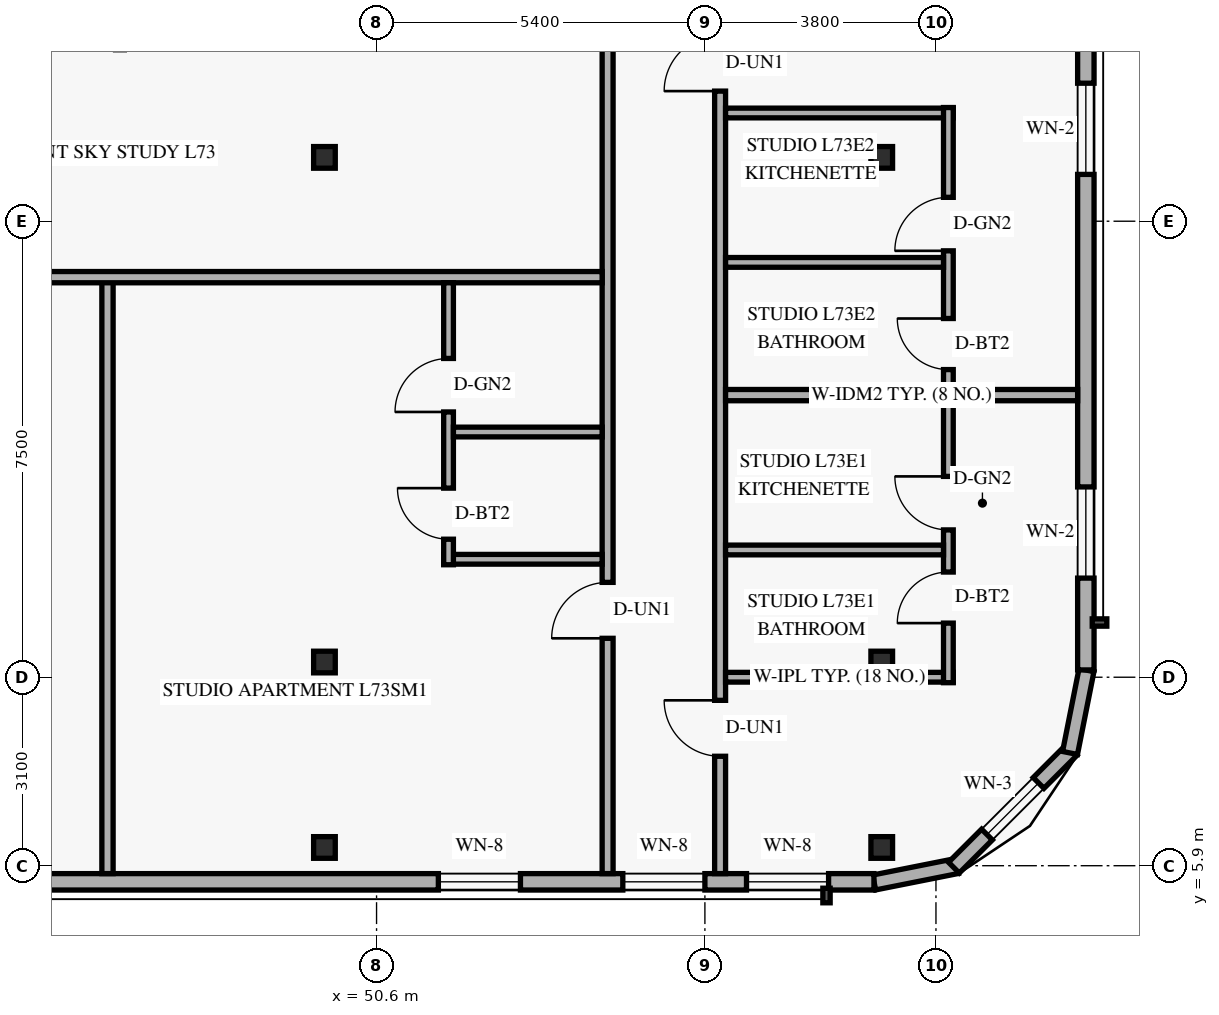
"""IFC4 building model, lengths in metres.
Left out: names, types, materials, properties, quantities, classifications, styles, units other than length and angle.
Written with IfcOpenShell. Run it as: python <this file> out.ifc"""

import sys

from ifc_helpers import new_model, si_unit, direction, frame, frame_2d, origin, origin_2d, place, context, subcontext, project, spatial, rectangle, hollow_rectangle, extrude, element, fill, save


model = new_model("IFC4")
c1 = context("Model", 3, precision=1e-05, world=origin(), true_north=direction((0.0, 1.0)))
c2 = subcontext(c1, "Body", "Model", "MODEL_VIEW")
j1 = project(units=[si_unit("LENGTHUNIT", "METRE"), si_unit("PLANEANGLEUNIT", "RADIAN")], contexts=[c1])
p1 = place(None, origin())
s1 = spatial("IfcSite", under=j1, at=p1, CompositionType="ELEMENT")
p2 = place(p1, origin())
s2 = spatial("IfcBuilding", under=s1, at=p2, CompositionType="ELEMENT")
p3 = place(p2, frame((0.0, 0.0, 278.4)))
s3 = spatial("IfcBuildingStorey", under=s2, at=p3, CompositionType="ELEMENT", Elevation=278.4)
for number, where, z_axis, x_axis in (
    (1, (49.68, 6.2, 0.0), (0.035, 0.0, 0.999), (0.0, 1.0, 0.0)),
    (2, (49.68, 9.25, 0.0), (0.035, 0.0, 0.999), (0.0, 1.0, 0.0)),
    (3, (49.68, 17.55, 0.0), (0.035, 0.0, 0.999), (0.0, 1.0, 0.0)),
):
    element("IfcColumn", number, at=place(p3, frame(where, z_axis=z_axis, x_axis=x_axis)), inside=s3, PredefinedType="COLUMN", context=c2, shape_type="SweptSolid", body=[
        extrude(hollow_rectangle(XDim=0.356, YDim=0.356, WallThickness=0.016, at=origin_2d()), origin(), (0.0, 0.0, 1.0), 3.602),
    ])
for number, where, z_axis, x_axis in (
    (4, (58.804, 6.2, 0.0), (0.058, 0.0, 0.998), (0.0, 1.0, 0.0)),
    (5, (58.804, 9.25, 0.0), (0.058, 0.0, 0.998), (0.0, 1.0, 0.0)),
    (6, (58.804, 17.55, 0.0), (0.058, 0.0, 0.998), (0.0, 1.0, 0.0)),
):
    element("IfcColumn", number, at=place(p3, frame(where, z_axis=z_axis, x_axis=x_axis)), inside=s3, PredefinedType="COLUMN", context=c2, shape_type="SweptSolid", body=[
        extrude(hollow_rectangle(XDim=0.356, YDim=0.356, WallThickness=0.016, at=origin_2d()), origin(), (0.0, 0.0, 1.0), 3.606),
    ])
p4 = place(p3, frame((58.783, 5.624, 0.0), z_axis=(0.0, 0.0, 1.0), x_axis=(0.980809899341, 0.19496651342, 0.0)))
e7 = element("IfcWall", 7, at=p4, inside=s3, PredefinedType="SOLIDWALL", context=c2, shape_type="SweptSolid", body=[
    extrude(rectangle(XDim=1.389, YDim=0.25, at=frame_2d((0.694, 0.0))), origin(), (0.0, 0.0, 1.0), 3.3),
])
p5 = place(p3, frame((60.095, 5.868, 0.0), z_axis=(0.0, 0.0, 1.0), x_axis=(0.707106781187, 0.707106781187, 0.0)))
e8 = element("IfcWall", 8, at=p5, inside=s3, PredefinedType="SOLIDWALL", context=c2, shape_type="SweptSolid", body=[
    extrude(rectangle(XDim=2.739, YDim=0.25, at=frame_2d((1.37, 0.0))), origin(), (0.0, 0.0, 1.0), 3.3),
])
p6 = place(p5, frame((0.77, 0.0, 0.85)))
e9 = element("IfcOpeningElement", 9, at=p6, cuts=e8, PredefinedType="OPENING", context=c2, shape_type="SweptSolid", body=[
    extrude(rectangle(XDim=1.2, YDim=1.5, at=frame_2d((0.6, 0.75))), frame((0.0, 0.135, 0.0), z_axis=(0.0, -1.0, 0.0), x_axis=(1.0, 0.0, 0.0)), (0.0, 0.0, 1.0), 0.27),
])
p7 = place(p3, frame((62.005, 7.754, 0.0), z_axis=(0.0, 0.0, 1.0), x_axis=(0.195135625965, 0.9807762678, 0.0)))
e10 = element("IfcWall", 10, at=p7, inside=s3, PredefinedType="SOLIDWALL", context=c2, shape_type="SweptSolid", body=[
    extrude(rectangle(XDim=1.389, YDim=0.25, at=frame_2d((0.694, 0.0))), origin(), (0.0, 0.0, 1.0), 3.3),
])
p8 = place(p3, frame((25.82, 5.635, 0.0), z_axis=(0.0, 0.0, 1.0), x_axis=(1.0, 0.0, 0.0)))
e11 = element("IfcWall", 11, at=p8, inside=s3, PredefinedType="SOLIDWALL", context=c2, shape_type="SweptSolid", body=[
    extrude(rectangle(XDim=32.96, YDim=0.27, at=frame_2d((16.48, 0.0))), origin(), (0.0, 0.0, 1.0), 3.3),
])
p9 = place(p8, frame((14.413, 0.0, 0.85)))
e12 = element("IfcOpeningElement", 12, at=p9, cuts=e11, PredefinedType="OPENING", context=c2, shape_type="SweptSolid", body=[
    extrude(rectangle(XDim=1.35, YDim=1.55, at=frame_2d((0.675, 0.775))), frame((0.0, 0.145, 0.0), z_axis=(0.0, -1.0, 0.0), x_axis=(1.0, 0.0, 0.0)), (0.0, 0.0, 1.0), 0.29),
])
p10 = place(p8, frame((25.796, 0.0, 0.85)))
e13 = element("IfcOpeningElement", 13, at=p10, cuts=e11, PredefinedType="OPENING", context=c2, shape_type="SweptSolid", body=[
    extrude(rectangle(XDim=1.35, YDim=1.55, at=frame_2d((0.675, 0.775))), frame((0.0, 0.145, 0.0), z_axis=(0.0, -1.0, 0.0), x_axis=(1.0, 0.0, 0.0)), (0.0, 0.0, 1.0), 0.29),
])
p11 = place(p8, frame((28.83, 0.0, 0.85)))
e14 = element("IfcOpeningElement", 14, at=p11, cuts=e11, PredefinedType="OPENING", context=c2, shape_type="SweptSolid", body=[
    extrude(rectangle(XDim=1.35, YDim=1.55, at=frame_2d((0.675, 0.775))), frame((0.0, 0.145, 0.0), z_axis=(0.0, -1.0, 0.0), x_axis=(1.0, 0.0, 0.0)), (0.0, 0.0, 1.0), 0.29),
])
p12 = place(p8, frame((30.864, 0.0, 0.85)))
e15 = element("IfcOpeningElement", 15, at=p12, cuts=e11, PredefinedType="OPENING", context=c2, shape_type="SweptSolid", body=[
    extrude(rectangle(XDim=1.35, YDim=1.55, at=frame_2d((0.675, 0.775))), frame((0.0, 0.145, 0.0), z_axis=(0.0, -1.0, 0.0), x_axis=(1.0, 0.0, 0.0)), (0.0, 0.0, 1.0), 0.29),
])
p13 = place(p3, frame((62.265, 9.12, 0.0), z_axis=(0.0, 0.0, 1.0), x_axis=(0.0, 1.0, 0.0)))
e16 = element("IfcWall", 16, at=p13, inside=s3, PredefinedType="SOLIDWALL", context=c2, shape_type="SweptSolid", body=[
    extrude(rectangle(XDim=13.28, YDim=0.27, at=frame_2d((6.64, 0.0))), origin(), (0.0, 0.0, 1.0), 3.3),
])
p14 = place(p13, frame((1.51, 0.0, 0.85)))
e17 = element("IfcOpeningElement", 17, at=p14, cuts=e16, PredefinedType="OPENING", context=c2, shape_type="SweptSolid", body=[
    extrude(rectangle(XDim=1.5, YDim=1.55, at=frame_2d((0.75, 0.775))), frame((0.0, 0.145, 0.0), z_axis=(0.0, -1.0, 0.0), x_axis=(1.0, 0.0, 0.0)), (0.0, 0.0, 1.0), 0.29),
])
p15 = place(p13, frame((8.15, 0.0, 0.85)))
e18 = element("IfcOpeningElement", 18, at=p15, cuts=e16, PredefinedType="OPENING", context=c2, shape_type="SweptSolid", body=[
    extrude(rectangle(XDim=1.5, YDim=1.55, at=frame_2d((0.75, 0.775))), frame((0.0, 0.145, 0.0), z_axis=(0.0, -1.0, 0.0), x_axis=(1.0, 0.0, 0.0)), (0.0, 0.0, 1.0), 0.29),
])
p16 = place(p3, frame((54.4, 5.77, 0.0), z_axis=(0.0, 0.0, 1.0), x_axis=(0.0, 1.0, 0.0)))
e19 = element("IfcWall", 19, at=p16, inside=s3, PredefinedType="STANDARD", context=c2, shape_type="SweptSolid", body=[
    extrude(rectangle(XDim=21.79, YDim=0.18, at=frame_2d((10.895, 0.0))), origin(), (0.0, 0.0, 1.0), 2.743),
])
p17 = place(p16, frame((3.87, 0.0, 0.0)))
e20 = element("IfcOpeningElement", 20, at=p17, cuts=e19, PredefinedType="OPENING", context=c2, shape_type="SweptSolid", body=[
    extrude(rectangle(XDim=0.92, YDim=2.15, at=frame_2d((0.46, 1.075))), frame((0.0, 0.1, 0.0), z_axis=(0.0, -1.0, 0.0), x_axis=(1.0, 0.0, 0.0)), (0.0, 0.0, 1.0), 0.2),
])
p18 = place(p3, frame((56.25, 5.77, 0.0), z_axis=(0.0, 0.0, 1.0), x_axis=(0.0, 1.0, 0.0)))
e21 = element("IfcWall", 21, at=p18, inside=s3, PredefinedType="STANDARD", context=c2, shape_type="SweptSolid", body=[
    extrude(rectangle(XDim=36.46, YDim=0.18, at=frame_2d((18.23, 0.0))), origin(), (0.0, 0.0, 1.0), 2.743),
])
p19 = place(p18, frame((1.93, 0.0, 0.0)))
e22 = element("IfcOpeningElement", 22, at=p19, cuts=e21, PredefinedType="OPENING", context=c2, shape_type="SweptSolid", body=[
    extrude(rectangle(XDim=0.92, YDim=2.15, at=frame_2d((0.46, 1.075))), frame((0.0, 0.1, 0.0), z_axis=(0.0, -1.0, 0.0), x_axis=(1.0, 0.0, 0.0)), (0.0, 0.0, 1.0), 0.2),
])
p20 = place(p18, frame((12.87, 0.0, 0.0)))
e23 = element("IfcOpeningElement", 23, at=p20, cuts=e21, PredefinedType="OPENING", context=c2, shape_type="SweptSolid", body=[
    extrude(rectangle(XDim=0.92, YDim=2.15, at=frame_2d((0.46, 1.075))), frame((0.0, 0.1, 0.0), z_axis=(0.0, -1.0, 0.0), x_axis=(1.0, 0.0, 0.0)), (0.0, 0.0, 1.0), 0.2),
])
p21 = place(p18, frame((21.38, 0.0, 0.0)))
e24 = element("IfcOpeningElement", 24, at=p21, cuts=e21, PredefinedType="OPENING", context=c2, shape_type="SweptSolid", body=[
    extrude(rectangle(XDim=0.92, YDim=2.15, at=frame_2d((0.46, 1.075))), frame((0.0, 0.1, 0.0), z_axis=(0.0, -1.0, 0.0), x_axis=(1.0, 0.0, 0.0)), (0.0, 0.0, 1.0), 0.2),
])
p22 = place(p18, frame((27.39, 0.0, 0.0)))
e25 = element("IfcOpeningElement", 25, at=p22, cuts=e21, PredefinedType="OPENING", context=c2, shape_type="SweptSolid", body=[
    extrude(rectangle(XDim=0.92, YDim=2.15, at=frame_2d((0.46, 1.075))), frame((0.0, 0.1, 0.0), z_axis=(0.0, -1.0, 0.0), x_axis=(1.0, 0.0, 0.0)), (0.0, 0.0, 1.0), 0.2),
])
p23 = place(p18, frame((33.235, 0.0, 0.0)))
e26 = element("IfcOpeningElement", 26, at=p23, cuts=e21, PredefinedType="OPENING", context=c2, shape_type="SweptSolid", body=[
    extrude(rectangle(XDim=0.92, YDim=2.15, at=frame_2d((0.46, 1.075))), frame((0.0, 0.1, 0.0), z_axis=(0.0, -1.0, 0.0), x_axis=(1.0, 0.0, 0.0)), (0.0, 0.0, 1.0), 0.2),
])
p24 = place(p3, frame((56.34, 9.0, 0.0), z_axis=(0.0, 0.0, 1.0), x_axis=(1.0, 0.0, 0.0)))
e27 = element("IfcWall", 27, at=p24, inside=s3, PredefinedType="PLUMBINGWALL", context=c2, shape_type="SweptSolid", body=[
    extrude(rectangle(XDim=3.744, YDim=0.16, at=frame_2d((1.872, 0.0))), origin(), (0.0, 0.0, 1.0), 2.743),
])
p25 = place(p3, frame((60.004, 8.91, 0.0), z_axis=(0.0, 0.0, 1.0), x_axis=(0.0, 1.0, 0.0)))
e28 = element("IfcWall", 28, at=p25, inside=s3, PredefinedType="PLUMBINGWALL", context=c2, shape_type="SweptSolid", body=[
    extrude(rectangle(XDim=4.73, YDim=0.16, at=frame_2d((2.365, 0.0))), origin(), (0.0, 0.0, 1.0), 3.3),
])
p26 = place(p25, frame((0.98, 0.0, 0.0)))
e29 = element("IfcOpeningElement", 29, at=p26, cuts=e28, PredefinedType="OPENING", context=c2, shape_type="SweptSolid", body=[
    extrude(rectangle(XDim=0.84, YDim=2.12, at=frame_2d((0.42, 1.06))), frame((0.0, 0.09, 0.0), z_axis=(0.0, -1.0, 0.0), x_axis=(1.0, 0.0, 0.0)), (0.0, 0.0, 1.0), 0.18),
])
p27 = place(p25, frame((2.513, 0.0, 0.0)))
e30 = element("IfcOpeningElement", 30, at=p27, cuts=e28, PredefinedType="OPENING", context=c2, shape_type="SweptSolid", body=[
    extrude(rectangle(XDim=0.88, YDim=2.12, at=frame_2d((0.44, 1.06))), frame((0.0, 0.09, 0.0), z_axis=(0.0, -1.0, 0.0), x_axis=(1.0, 0.0, 0.0)), (0.0, 0.0, 1.0), 0.18),
])
p28 = place(p3, frame((56.34, 11.093, 0.0), z_axis=(0.0, 0.0, 1.0), x_axis=(1.0, 0.0, 0.0)))
e31 = element("IfcWall", 31, at=p28, inside=s3, PredefinedType="PLUMBINGWALL", context=c2, shape_type="SweptSolid", body=[
    extrude(rectangle(XDim=3.584, YDim=0.16, at=frame_2d((1.792, 0.0))), origin(), (0.0, 0.0, 1.0), 2.743),
])
p29 = place(p3, frame((56.34, 13.64, 0.0), z_axis=(0.0, 0.0, 1.0), x_axis=(1.0, 0.0, 0.0)))
e32 = element("IfcWall", 32, at=p29, inside=s3, PredefinedType="PARTITIONING", context=c2, shape_type="SweptSolid", body=[
    extrude(rectangle(XDim=5.79, YDim=0.185, at=frame_2d((2.895, 0.0))), origin(), (0.0, 0.0, 1.0), 2.743),
])
p30 = place(p3, frame((56.34, 18.28, 0.0), z_axis=(0.0, 0.0, 1.0), x_axis=(1.0, 0.0, 0.0)))
e33 = element("IfcWall", 33, at=p30, inside=s3, PredefinedType="PLUMBINGWALL", context=c2, shape_type="SweptSolid", body=[
    extrude(rectangle(XDim=3.744, YDim=0.16, at=frame_2d((1.872, 0.0))), origin(), (0.0, 0.0, 1.0), 2.743),
])
p31 = place(p3, frame((60.004, 13.732, 0.0), z_axis=(0.0, 0.0, 1.0), x_axis=(0.0, 1.0, 0.0)))
e34 = element("IfcWall", 34, at=p31, inside=s3, PredefinedType="PLUMBINGWALL", context=c2, shape_type="SweptSolid", body=[
    extrude(rectangle(XDim=4.638, YDim=0.16, at=frame_2d((2.319, 0.0))), origin(), (0.0, 0.0, 1.0), 3.3),
])
p32 = place(p31, frame((0.327, 0.0, 0.0)))
e35 = element("IfcOpeningElement", 35, at=p32, cuts=e34, PredefinedType="OPENING", context=c2, shape_type="SweptSolid", body=[
    extrude(rectangle(XDim=0.84, YDim=2.12, at=frame_2d((0.42, 1.06))), frame((0.0, 0.09, 0.0), z_axis=(0.0, -1.0, 0.0), x_axis=(1.0, 0.0, 0.0)), (0.0, 0.0, 1.0), 0.18),
])
p33 = place(p31, frame((2.281, 0.0, 0.0)))
e36 = element("IfcOpeningElement", 36, at=p33, cuts=e34, PredefinedType="OPENING", context=c2, shape_type="SweptSolid", body=[
    extrude(rectangle(XDim=0.88, YDim=2.12, at=frame_2d((0.44, 1.06))), frame((0.0, 0.09, 0.0), z_axis=(0.0, -1.0, 0.0), x_axis=(1.0, 0.0, 0.0)), (0.0, 0.0, 1.0), 0.18),
])
p34 = place(p3, frame((56.34, 15.823, 0.0), z_axis=(0.0, 0.0, 1.0), x_axis=(1.0, 0.0, 0.0)))
e37 = element("IfcWall", 37, at=p34, inside=s3, PredefinedType="PLUMBINGWALL", context=c2, shape_type="SweptSolid", body=[
    extrude(rectangle(XDim=3.584, YDim=0.16, at=frame_2d((1.792, 0.0))), origin(), (0.0, 0.0, 1.0), 2.743),
])
p35 = place(p3, frame((46.175, 5.77, 0.0), z_axis=(0.0, 0.0, 1.0), x_axis=(0.0, 1.0, 0.0)))
e38 = element("IfcWall", 38, at=p35, inside=s3, PredefinedType="PARTITIONING", context=c2, shape_type="SweptSolid", body=[
    extrude(rectangle(XDim=9.81, YDim=0.185, at=frame_2d((4.905, 0.0))), origin(), (0.0, 0.0, 1.0), 2.743),
])
p36 = place(p3, frame((38.022, 15.58, 0.0), z_axis=(0.0, 0.0, 1.0), x_axis=(1.0, 0.0, 0.0)))
e39 = element("IfcWall", 39, at=p36, inside=s3, PredefinedType="PARTITIONING", context=c2, shape_type="SweptSolid", body=[
    extrude(rectangle(XDim=16.288, YDim=0.185, at=frame_2d((8.144, 0.0))), origin(), (0.0, 0.0, 1.0), 2.743),
])
p37 = place(p3, frame((51.704, 10.94, 0.0), z_axis=(0.0, 0.0, 1.0), x_axis=(1.0, 0.0, 0.0)))
e40 = element("IfcWall", 40, at=p37, inside=s3, PredefinedType="PLUMBINGWALL", context=c2, shape_type="SweptSolid", body=[
    extrude(rectangle(XDim=2.606, YDim=0.16, at=frame_2d((1.303, 0.0))), origin(), (0.0, 0.0, 1.0), 3.3),
])
p38 = place(p3, frame((51.784, 10.85, 0.0), z_axis=(0.0, 0.0, 1.0), x_axis=(0.0, 1.0, 0.0)))
e41 = element("IfcWall", 41, at=p38, inside=s3, PredefinedType="PLUMBINGWALL", context=c2, shape_type="SweptSolid", body=[
    extrude(rectangle(XDim=4.637, YDim=0.16, at=frame_2d((2.319, 0.0))), origin(), (0.0, 0.0, 1.0), 2.979),
])
p39 = place(p38, frame((0.42, 0.0, 0.0)))
e42 = element("IfcOpeningElement", 42, at=p39, cuts=e41, PredefinedType="OPENING", context=c2, shape_type="SweptSolid", body=[
    extrude(rectangle(XDim=0.84, YDim=2.12, at=frame_2d((0.42, 1.06))), frame((0.0, 0.09, 0.0), z_axis=(0.0, -1.0, 0.0), x_axis=(1.0, 0.0, 0.0)), (0.0, 0.0, 1.0), 0.18),
])
p40 = place(p38, frame((2.513, 0.0, 0.0)))
e43 = element("IfcOpeningElement", 43, at=p40, cuts=e41, PredefinedType="OPENING", context=c2, shape_type="SweptSolid", body=[
    extrude(rectangle(XDim=0.88, YDim=2.12, at=frame_2d((0.44, 1.06))), frame((0.0, 0.09, 0.0), z_axis=(0.0, -1.0, 0.0), x_axis=(1.0, 0.0, 0.0)), (0.0, 0.0, 1.0), 0.18),
])
p41 = place(p3, frame((51.864, 13.033, 0.0), z_axis=(0.0, 0.0, 1.0), x_axis=(1.0, 0.0, 0.0)))
e44 = element("IfcWall", 44, at=p41, inside=s3, PredefinedType="PLUMBINGWALL", context=c2, shape_type="SweptSolid", body=[
    extrude(rectangle(XDim=2.446, YDim=0.16, at=frame_2d((1.223, 0.0))), origin(), (0.0, 0.0, 1.0), 3.3),
])
p42 = place(p6, origin())
e45 = element("IfcWindow", 45, at=p42, inside=s3, PartitioningType="SINGLE_PANEL", PredefinedType="WINDOW", context=c2, shape_type="SweptSolid", body=[
    extrude(rectangle(XDim=1.2, YDim=1.5, at=frame_2d((0.6, 0.75))), frame((0.0, 0.03, 0.0), z_axis=(0.0, -1.0, 0.0), x_axis=(1.0, 0.0, 0.0)), (0.0, 0.0, 1.0), 0.06),
])
fill(e9, e45)
p43 = place(p10, origin())
e46 = element("IfcWindow", 46, at=p43, inside=s3, PartitioningType="SINGLE_PANEL", PredefinedType="WINDOW", context=c2, shape_type="SweptSolid", body=[
    extrude(rectangle(XDim=1.35, YDim=1.55, at=frame_2d((0.675, 0.775))), frame((0.0, 0.03, 0.0), z_axis=(0.0, -1.0, 0.0), x_axis=(1.0, 0.0, 0.0)), (0.0, 0.0, 1.0), 0.06),
])
fill(e13, e46)
p44 = place(p11, origin())
e47 = element("IfcWindow", 47, at=p44, inside=s3, PartitioningType="SINGLE_PANEL", PredefinedType="WINDOW", context=c2, shape_type="SweptSolid", body=[
    extrude(rectangle(XDim=1.35, YDim=1.55, at=frame_2d((0.675, 0.775))), frame((0.0, 0.03, 0.0), z_axis=(0.0, -1.0, 0.0), x_axis=(1.0, 0.0, 0.0)), (0.0, 0.0, 1.0), 0.06),
])
fill(e14, e47)
p45 = place(p12, origin())
e48 = element("IfcWindow", 48, at=p45, inside=s3, PartitioningType="SINGLE_PANEL", PredefinedType="WINDOW", context=c2, shape_type="SweptSolid", body=[
    extrude(rectangle(XDim=1.35, YDim=1.55, at=frame_2d((0.675, 0.775))), frame((0.0, 0.03, 0.0), z_axis=(0.0, -1.0, 0.0), x_axis=(1.0, 0.0, 0.0)), (0.0, 0.0, 1.0), 0.06),
])
fill(e15, e48)
p46 = place(p14, origin())
e49 = element("IfcWindow", 49, at=p46, inside=s3, PartitioningType="SINGLE_PANEL", PredefinedType="WINDOW", context=c2, shape_type="SweptSolid", body=[
    extrude(rectangle(XDim=1.5, YDim=1.55, at=frame_2d((0.75, 0.775))), frame((0.0, 0.03, 0.0), z_axis=(0.0, -1.0, 0.0), x_axis=(1.0, 0.0, 0.0)), (0.0, 0.0, 1.0), 0.06),
])
fill(e17, e49)
p47 = place(p15, origin())
e50 = element("IfcWindow", 50, at=p47, inside=s3, PartitioningType="SINGLE_PANEL", PredefinedType="WINDOW", context=c2, shape_type="SweptSolid", body=[
    extrude(rectangle(XDim=1.5, YDim=1.55, at=frame_2d((0.75, 0.775))), frame((0.0, 0.03, 0.0), z_axis=(0.0, -1.0, 0.0), x_axis=(1.0, 0.0, 0.0)), (0.0, 0.0, 1.0), 0.06),
])
fill(e18, e50)
p48 = place(p19, origin())
e51 = element("IfcDoor", 51, at=p48, inside=s3, OperationType="SINGLE_SWING_RIGHT", PredefinedType="DOOR", context=c2, shape_type="SweptSolid", body=[
    extrude(rectangle(XDim=0.92, YDim=2.15, at=frame_2d((0.46, 1.075))), frame((0.0, 0.025, 0.0), z_axis=(0.0, -1.0, 0.0), x_axis=(1.0, 0.0, 0.0)), (0.0, 0.0, 1.0), 0.05),
])
fill(e22, e51)
p49 = place(p26, origin())
e52 = element("IfcDoor", 52, at=p49, inside=s3, OperationType="SINGLE_SWING_LEFT", PredefinedType="DOOR", context=c2, shape_type="SweptSolid", body=[
    extrude(rectangle(XDim=0.84, YDim=2.12, at=frame_2d((0.42, 1.06))), frame((0.0, 0.025, 0.0), z_axis=(0.0, -1.0, 0.0), x_axis=(1.0, 0.0, 0.0)), (0.0, 0.0, 1.0), 0.05),
])
fill(e29, e52)
p50 = place(p27, origin())
e53 = element("IfcDoor", 53, at=p50, inside=s3, OperationType="SINGLE_SWING_RIGHT", PredefinedType="DOOR", context=c2, shape_type="SweptSolid", body=[
    extrude(rectangle(XDim=0.88, YDim=2.12, at=frame_2d((0.44, 1.06))), frame((0.0, 0.025, 0.0), z_axis=(0.0, -1.0, 0.0), x_axis=(1.0, 0.0, 0.0)), (0.0, 0.0, 1.0), 0.05),
])
fill(e30, e53)
p51 = place(p20, origin())
e54 = element("IfcDoor", 54, at=p51, inside=s3, OperationType="SINGLE_SWING_LEFT", PredefinedType="DOOR", context=c2, shape_type="SweptSolid", body=[
    extrude(rectangle(XDim=0.92, YDim=2.15, at=frame_2d((0.46, 1.075))), frame((0.0, 0.025, 0.0), z_axis=(0.0, -1.0, 0.0), x_axis=(1.0, 0.0, 0.0)), (0.0, 0.0, 1.0), 0.05),
])
fill(e23, e54)
p52 = place(p32, origin())
e55 = element("IfcDoor", 55, at=p52, inside=s3, OperationType="SINGLE_SWING_RIGHT", PredefinedType="DOOR", context=c2, shape_type="SweptSolid", body=[
    extrude(rectangle(XDim=0.84, YDim=2.12, at=frame_2d((0.42, 1.06))), frame((0.0, 0.025, 0.0), z_axis=(0.0, -1.0, 0.0), x_axis=(1.0, 0.0, 0.0)), (0.0, 0.0, 1.0), 0.05),
])
fill(e35, e55)
p53 = place(p33, origin())
e56 = element("IfcDoor", 56, at=p53, inside=s3, OperationType="SINGLE_SWING_LEFT", PredefinedType="DOOR", context=c2, shape_type="SweptSolid", body=[
    extrude(rectangle(XDim=0.88, YDim=2.12, at=frame_2d((0.44, 1.06))), frame((0.0, 0.025, 0.0), z_axis=(0.0, -1.0, 0.0), x_axis=(1.0, 0.0, 0.0)), (0.0, 0.0, 1.0), 0.05),
])
fill(e36, e56)
p54 = place(p17, origin())
e57 = element("IfcDoor", 57, at=p54, inside=s3, OperationType="SINGLE_SWING_LEFT", PredefinedType="DOOR", context=c2, shape_type="SweptSolid", body=[
    extrude(rectangle(XDim=0.92, YDim=2.15, at=frame_2d((0.46, 1.075))), frame((0.0, 0.025, 0.0), z_axis=(0.0, -1.0, 0.0), x_axis=(1.0, 0.0, 0.0)), (0.0, 0.0, 1.0), 0.05),
])
fill(e20, e57)
p55 = place(p39, origin())
e58 = element("IfcDoor", 58, at=p55, inside=s3, OperationType="SINGLE_SWING_RIGHT", PredefinedType="DOOR", context=c2, shape_type="SweptSolid", body=[
    extrude(rectangle(XDim=0.84, YDim=2.12, at=frame_2d((0.42, 1.06))), frame((0.0, 0.025, 0.0), z_axis=(0.0, -1.0, 0.0), x_axis=(1.0, 0.0, 0.0)), (0.0, 0.0, 1.0), 0.05),
])
fill(e42, e58)
p56 = place(p40, origin())
e59 = element("IfcDoor", 59, at=p56, inside=s3, OperationType="SINGLE_SWING_LEFT", PredefinedType="DOOR", context=c2, shape_type="SweptSolid", body=[
    extrude(rectangle(XDim=0.88, YDim=2.12, at=frame_2d((0.44, 1.06))), frame((0.0, 0.025, 0.0), z_axis=(0.0, -1.0, 0.0), x_axis=(1.0, 0.0, 0.0)), (0.0, 0.0, 1.0), 0.05),
])
fill(e43, e59)
save(model, sys.argv[1])
